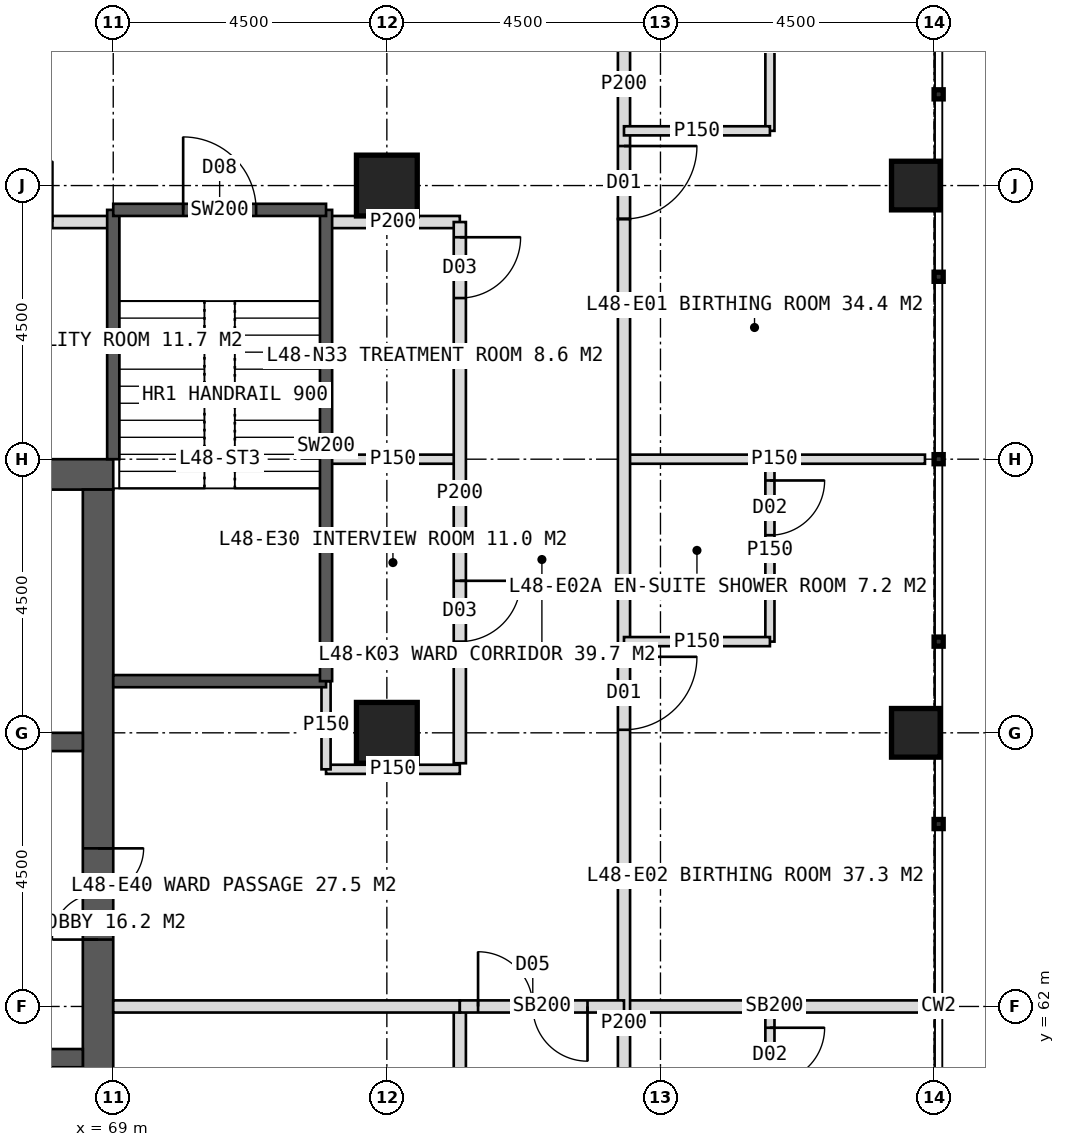
"""IFC4 building model, lengths in metres.
Left out: names, types, materials, properties, quantities, classifications, styles, units other than length and angle.
Written with IfcOpenShell. Run it as: python <this file> out.ifc"""

import sys

from ifc_helpers import new_model, si_unit, direction, frame, frame_2d, origin, origin_2d, place, context, subcontext, project, spatial, rectangle, hollow_rectangle, extrude, element, fill, save


model = new_model("IFC4")
c1 = context("Model", 3, precision=1e-05, world=origin(), true_north=direction((0.0, 1.0)))
c2 = subcontext(c1, "Body", "Model", "MODEL_VIEW")
j1 = project(units=[si_unit("LENGTHUNIT", "METRE"), si_unit("PLANEANGLEUNIT", "RADIAN")], contexts=[c1])
p1 = place(None, origin())
s1 = spatial("IfcSite", under=j1, at=p1, CompositionType="ELEMENT")
p2 = place(p1, origin())
s2 = spatial("IfcBuilding", under=s1, at=p2, CompositionType="ELEMENT")
p3 = place(p2, frame((0.0, 0.0, 201.0)))
s3 = spatial("IfcBuildingStorey", under=s2, at=p3, CompositionType="ELEMENT", Elevation=201.0)
p4 = place(p3, frame((51.0, 70.75, 0.0), z_axis=(0.0, 0.0, 1.0), x_axis=(1.0, 0.0, 0.0)))
e1 = element("IfcWall", 1, at=p4, inside=s3, PredefinedType="SHEAR", context=c2, shape_type="SweptSolid", body=[
    extrude(rectangle(XDim=18.0, YDim=0.5, at=frame_2d((9.0, 0.0))), origin(), (0.0, 0.0, 1.0), 4.0),
])
p5 = place(p4, frame((8.1, 0.0, 0.0)))
e2 = element("IfcOpeningElement", 2, at=p5, cuts=e1, PredefinedType="OPENING", context=c2, shape_type="SweptSolid", body=[
    extrude(rectangle(XDim=1.8, YDim=2.2, at=frame_2d((0.9, 1.1))), frame((0.0, 0.26, 0.0), z_axis=(0.0, -1.0, 0.0), x_axis=(1.0, 0.0, 0.0)), (0.0, 0.0, 1.0), 0.52),
])
p6 = place(p3, frame((68.75, 53.5, 0.0), z_axis=(0.0, 0.0, 1.0), x_axis=(0.0, 1.0, 0.0)))
e3 = element("IfcWall", 3, at=p6, inside=s3, PredefinedType="SHEAR", context=c2, shape_type="SweptSolid", body=[
    extrude(rectangle(XDim=17.0, YDim=0.5, at=frame_2d((8.5, 0.0))), origin(), (0.0, 0.0, 1.0), 4.0),
])
p7 = place(p6, frame((9.6, 0.0, 0.0)))
e4 = element("IfcOpeningElement", 4, at=p7, cuts=e3, PredefinedType="OPENING", context=c2, shape_type="SweptSolid", body=[
    extrude(rectangle(XDim=1.5, YDim=2.2, at=frame_2d((0.75, 1.1))), frame((0.0, 0.26, 0.0), z_axis=(0.0, -1.0, 0.0), x_axis=(1.0, 0.0, 0.0)), (0.0, 0.0, 1.0), 0.52),
])
p8 = place(p3, frame((65.2, 61.15, 0.0), z_axis=(0.0, 0.0, 1.0), x_axis=(1.0, 0.0, 0.0)))
e5 = element("IfcWall", 5, at=p8, inside=s3, PredefinedType="SHEAR", context=c2, shape_type="SweptSolid", body=[
    extrude(rectangle(XDim=3.3, YDim=0.3, at=frame_2d((1.65, 0.0))), origin(), (0.0, 0.0, 1.0), 4.0),
])
p9 = place(p8, frame((1.05, 0.0, 0.0)))
e6 = element("IfcOpeningElement", 6, at=p9, cuts=e5, PredefinedType="OPENING", context=c2, shape_type="SweptSolid", body=[
    extrude(rectangle(XDim=1.2, YDim=2.1, at=frame_2d((0.6, 1.05))), frame((0.0, 0.16, 0.0), z_axis=(0.0, -1.0, 0.0), x_axis=(1.0, 0.0, 0.0)), (0.0, 0.0, 1.0), 0.32),
])
p10 = place(p3, frame((65.2, 66.35, 0.0), z_axis=(0.0, 0.0, 1.0), x_axis=(1.0, 0.0, 0.0)))
e7 = element("IfcWall", 7, at=p10, inside=s3, PredefinedType="SHEAR", context=c2, shape_type="SweptSolid", body=[
    extrude(rectangle(XDim=3.3, YDim=0.3, at=frame_2d((1.65, 0.0))), origin(), (0.0, 0.0, 1.0), 4.0),
])
p11 = place(p10, frame((1.05, 0.0, 0.0)))
e8 = element("IfcOpeningElement", 8, at=p11, cuts=e7, PredefinedType="OPENING", context=c2, shape_type="SweptSolid", body=[
    extrude(rectangle(XDim=1.2, YDim=2.2, at=frame_2d((0.6, 1.1))), frame((0.0, 0.16, 0.0), z_axis=(0.0, -1.0, 0.0), x_axis=(1.0, 0.0, 0.0)), (0.0, 0.0, 1.0), 0.32),
])
for number, where, z_axis, x_axis in (
    (9, (73.5, 75.5, 0.0), (0.0, 0.0, 1.0), (1.0, 0.0, 0.0)),
    (10, (73.5, 66.5, 0.0), (0.0, 0.0, 1.0), (1.0, 0.0, 0.0)),
):
    element("IfcColumn", number, at=place(p3, frame(where, z_axis=z_axis, x_axis=x_axis)), inside=s3, PredefinedType="COLUMN", context=c2, shape_type="SweptSolid", body=[
        extrude(hollow_rectangle(XDim=1.0, YDim=1.0, WallThickness=0.1, at=origin_2d()), origin(), (0.0, 0.0, 1.0), 4.0),
    ])
for number, where, z_axis, x_axis in (
    (11, (82.2, 66.5, 0.0), (0.0, 0.0, 1.0), (1.0, 0.0, 0.0)),
    (12, (82.2, 75.5, 0.0), (0.0, 0.0, 1.0), (1.0, 0.0, 0.0)),
):
    element("IfcColumn", number, at=place(p3, frame(where, z_axis=z_axis, x_axis=x_axis)), inside=s3, PredefinedType="COLUMN", context=c2, shape_type="SweptSolid", body=[
        extrude(hollow_rectangle(XDim=0.8, YDim=0.8, WallThickness=0.08, at=origin_2d()), origin(), (0.0, 0.0, 1.0), 4.0),
    ])
p12 = place(p3, frame((62.25, 74.9, 0.0), z_axis=(0.0, 0.0, 1.0), x_axis=(1.0, 0.0, 0.0)))
e13 = element("IfcWall", 13, at=p12, inside=s3, PredefinedType="PARTITIONING", context=c2, shape_type="SweptSolid", body=[
    extrude(rectangle(XDim=6.75, YDim=0.2, at=frame_2d((3.375, 0.0))), origin(), (0.0, 0.0, 1.0), 3.75),
])
p13 = place(p12, frame((0.325, 0.0, 0.0)))
e14 = element("IfcOpeningElement", 14, at=p13, cuts=e13, PredefinedType="OPENING", context=c2, shape_type="SweptSolid", body=[
    extrude(rectangle(XDim=1.0, YDim=2.1, at=frame_2d((0.5, 1.05))), frame((0.0, 0.11, 0.0), z_axis=(0.0, -1.0, 0.0), x_axis=(1.0, 0.0, 0.0)), (0.0, 0.0, 1.0), 0.22),
])
p14 = place(p12, frame((4.75, 0.0, 0.0)))
e15 = element("IfcOpeningElement", 15, at=p14, cuts=e13, PredefinedType="OPENING", context=c2, shape_type="SweptSolid", body=[
    extrude(rectangle(XDim=1.0, YDim=2.1, at=frame_2d((0.5, 1.05))), frame((0.0, 0.11, 0.0), z_axis=(0.0, -1.0, 0.0), x_axis=(1.0, 0.0, 0.0)), (0.0, 0.0, 1.0), 0.22),
])
p15 = place(p3, frame((72.5, 74.9, 0.0), z_axis=(0.0, 0.0, 1.0), x_axis=(1.0, 0.0, 0.0)))
e16 = element("IfcWall", 16, at=p15, inside=s3, PredefinedType="PARTITIONING", context=c2, shape_type="SweptSolid", body=[
    extrude(rectangle(XDim=2.2, YDim=0.2, at=frame_2d((1.1, 0.0))), origin(), (0.0, 0.0, 1.0), 3.75),
])
p16 = place(p3, frame((77.4, 71.0, 0.0), z_axis=(0.0, 0.0, 1.0), x_axis=(1.0, 0.0, 0.0)))
e17 = element("IfcWall", 17, at=p16, inside=s3, PredefinedType="PARTITIONING", context=c2, shape_type="SweptSolid", body=[
    extrude(rectangle(XDim=4.95, YDim=0.15, at=frame_2d((2.475, 0.0))), origin(), (0.0, 0.0, 1.0), 3.75),
])
p17 = place(p3, frame((77.4, 62.0, 0.0), z_axis=(0.0, 0.0, 1.0), x_axis=(1.0, 0.0, 0.0)))
e18 = element("IfcWall", 18, at=p17, inside=s3, PredefinedType="SOLIDWALL", context=c2, shape_type="SweptSolid", body=[
    extrude(rectangle(XDim=4.95, YDim=0.2, at=frame_2d((2.475, 0.0))), origin(), (0.0, 0.0, 1.0), 2.95),
])
p18 = place(p3, frame((77.4, 79.4, 0.0), z_axis=(0.0, 0.0, 1.0), x_axis=(0.0, -1.0, 0.0)))
e19 = element("IfcWall", 19, at=p18, inside=s3, PredefinedType="PARTITIONING", context=c2, shape_type="SweptSolid", body=[
    extrude(rectangle(XDim=4.45, YDim=0.2, at=frame_2d((2.225, 0.0))), origin(), (0.0, 0.0, 1.0), 2.85),
])
p19 = place(p18, frame((3.25, 0.0, 0.0)))
e20 = element("IfcOpeningElement", 20, at=p19, cuts=e19, PredefinedType="OPENING", context=c2, shape_type="SweptSolid", body=[
    extrude(rectangle(XDim=1.2, YDim=2.2, at=frame_2d((0.6, 1.1))), frame((0.0, 0.11, 0.0), z_axis=(0.0, -1.0, 0.0), x_axis=(1.0, 0.0, 0.0)), (0.0, 0.0, 1.0), 0.22),
])
p20 = place(p3, frame((77.4, 74.95, 0.0), z_axis=(0.0, 0.0, 1.0), x_axis=(0.0, -1.0, 0.0)))
e21 = element("IfcWall", 21, at=p20, inside=s3, PredefinedType="PARTITIONING", context=c2, shape_type="SweptSolid", body=[
    extrude(rectangle(XDim=26.45, YDim=0.2, at=frame_2d((13.225, 0.0))), origin(), (0.0, 0.0, 1.0), 3.75),
])
p21 = place(p20, frame((7.2, 0.0, 0.0)))
e22 = element("IfcOpeningElement", 22, at=p21, cuts=e21, PredefinedType="OPENING", context=c2, shape_type="SweptSolid", body=[
    extrude(rectangle(XDim=1.2, YDim=2.2, at=frame_2d((0.6, 1.1))), frame((0.0, 0.11, 0.0), z_axis=(0.0, -1.0, 0.0), x_axis=(1.0, 0.0, 0.0)), (0.0, 0.0, 1.0), 0.22),
])
p22 = place(p20, frame((16.2, 0.0, 0.0)))
e23 = element("IfcOpeningElement", 23, at=p22, cuts=e21, PredefinedType="OPENING", context=c2, shape_type="SweptSolid", body=[
    extrude(rectangle(XDim=1.2, YDim=2.2, at=frame_2d((0.6, 1.1))), frame((0.0, 0.11, 0.0), z_axis=(0.0, -1.0, 0.0), x_axis=(1.0, 0.0, 0.0)), (0.0, 0.0, 1.0), 0.22),
])
p23 = place(p20, frame((25.2, 0.0, 0.0)))
e24 = element("IfcOpeningElement", 24, at=p23, cuts=e21, PredefinedType="OPENING", context=c2, shape_type="SweptSolid", body=[
    extrude(rectangle(XDim=1.2, YDim=2.2, at=frame_2d((0.6, 1.1))), frame((0.0, 0.11, 0.0), z_axis=(0.0, -1.0, 0.0), x_axis=(1.0, 0.0, 0.0)), (0.0, 0.0, 1.0), 0.22),
])
p24 = place(p3, frame((79.8, 79.4, 0.0), z_axis=(0.0, 0.0, 1.0), x_axis=(0.0, -1.0, 0.0)))
e25 = element("IfcWall", 25, at=p24, inside=s3, PredefinedType="PARTITIONING", context=c2, shape_type="SweptSolid", body=[
    extrude(rectangle(XDim=3.0, YDim=0.15, at=frame_2d((1.5, 0.0))), origin(), (0.0, 0.0, 1.0), 3.75),
])
p25 = place(p24, frame((0.35, 0.0, 0.0)))
e26 = element("IfcOpeningElement", 26, at=p25, cuts=e25, PredefinedType="OPENING", context=c2, shape_type="SweptSolid", body=[
    extrude(rectangle(XDim=0.9, YDim=2.1, at=frame_2d((0.45, 1.05))), frame((0.0, 0.085, 0.0), z_axis=(0.0, -1.0, 0.0), x_axis=(1.0, 0.0, 0.0)), (0.0, 0.0, 1.0), 0.17),
])
p26 = place(p3, frame((77.4, 76.4, 0.0), z_axis=(0.0, 0.0, 1.0), x_axis=(1.0, 0.0, 0.0)))
e27 = element("IfcWall", 27, at=p26, inside=s3, PredefinedType="PARTITIONING", context=c2, shape_type="SweptSolid", body=[
    extrude(rectangle(XDim=2.4, YDim=0.15, at=frame_2d((1.2, 0.0))), origin(), (0.0, 0.0, 1.0), 3.75),
])
p27 = place(p3, frame((79.8, 71.0, 0.0), z_axis=(0.0, 0.0, 1.0), x_axis=(0.0, -1.0, 0.0)))
e28 = element("IfcWall", 28, at=p27, inside=s3, PredefinedType="PARTITIONING", context=c2, shape_type="SweptSolid", body=[
    extrude(rectangle(XDim=3.0, YDim=0.15, at=frame_2d((1.5, 0.0))), origin(), (0.0, 0.0, 1.0), 3.75),
])
p28 = place(p27, frame((0.35, 0.0, 0.0)))
e29 = element("IfcOpeningElement", 29, at=p28, cuts=e28, PredefinedType="OPENING", context=c2, shape_type="SweptSolid", body=[
    extrude(rectangle(XDim=0.9, YDim=2.1, at=frame_2d((0.45, 1.05))), frame((0.0, 0.085, 0.0), z_axis=(0.0, -1.0, 0.0), x_axis=(1.0, 0.0, 0.0)), (0.0, 0.0, 1.0), 0.17),
])
p29 = place(p3, frame((77.4, 68.0, 0.0), z_axis=(0.0, 0.0, 1.0), x_axis=(1.0, 0.0, 0.0)))
e30 = element("IfcWall", 30, at=p29, inside=s3, PredefinedType="PARTITIONING", context=c2, shape_type="SweptSolid", body=[
    extrude(rectangle(XDim=2.4, YDim=0.15, at=frame_2d((1.2, 0.0))), origin(), (0.0, 0.0, 1.0), 3.75),
])
p30 = place(p3, frame((79.8, 62.0, 0.0), z_axis=(0.0, 0.0, 1.0), x_axis=(0.0, -1.0, 0.0)))
e31 = element("IfcWall", 31, at=p30, inside=s3, PredefinedType="PARTITIONING", context=c2, shape_type="SweptSolid", body=[
    extrude(rectangle(XDim=3.0, YDim=0.15, at=frame_2d((1.5, 0.0))), origin(), (0.0, 0.0, 1.0), 3.75),
])
p31 = place(p30, frame((0.35, 0.0, 0.0)))
e32 = element("IfcOpeningElement", 32, at=p31, cuts=e31, PredefinedType="OPENING", context=c2, shape_type="SweptSolid", body=[
    extrude(rectangle(XDim=0.9, YDim=2.1, at=frame_2d((0.45, 1.05))), frame((0.0, 0.085, 0.0), z_axis=(0.0, -1.0, 0.0), x_axis=(1.0, 0.0, 0.0)), (0.0, 0.0, 1.0), 0.17),
])
p32 = place(p3, frame((72.5, 71.0, 0.0), z_axis=(0.0, 0.0, 1.0), x_axis=(1.0, 0.0, 0.0)))
e33 = element("IfcWall", 33, at=p32, inside=s3, PredefinedType="PARTITIONING", context=c2, shape_type="SweptSolid", body=[
    extrude(rectangle(XDim=2.2, YDim=0.15, at=frame_2d((1.1, 0.0))), origin(), (0.0, 0.0, 1.0), 3.75),
])
p33 = place(p3, frame((74.7, 74.9, 0.0), z_axis=(0.0, 0.0, 1.0), x_axis=(0.0, -1.0, 0.0)))
e34 = element("IfcWall", 34, at=p33, inside=s3, PredefinedType="PARTITIONING", context=c2, shape_type="SweptSolid", body=[
    extrude(rectangle(XDim=8.9, YDim=0.2, at=frame_2d((4.45, 0.0))), origin(), (0.0, 0.0, 1.0), 3.75),
])
p34 = place(p33, frame((0.25, 0.0, 0.0)))
e35 = element("IfcOpeningElement", 35, at=p34, cuts=e34, PredefinedType="OPENING", context=c2, shape_type="SweptSolid", body=[
    extrude(rectangle(XDim=1.0, YDim=2.1, at=frame_2d((0.5, 1.05))), frame((0.0, 0.11, 0.0), z_axis=(0.0, -1.0, 0.0), x_axis=(1.0, 0.0, 0.0)), (0.0, 0.0, 1.0), 0.22),
])
p35 = place(p33, frame((5.9, 0.0, 0.0)))
e36 = element("IfcOpeningElement", 36, at=p35, cuts=e34, PredefinedType="OPENING", context=c2, shape_type="SweptSolid", body=[
    extrude(rectangle(XDim=1.0, YDim=2.1, at=frame_2d((0.5, 1.05))), frame((0.0, 0.11, 0.0), z_axis=(0.0, -1.0, 0.0), x_axis=(1.0, 0.0, 0.0)), (0.0, 0.0, 1.0), 0.22),
])
p36 = place(p3, frame((74.7, 62.0, 0.0), z_axis=(0.0, 0.0, 1.0), x_axis=(0.0, -1.0, 0.0)))
e37 = element("IfcWall", 37, at=p36, inside=s3, PredefinedType="PARTITIONING", context=c2, shape_type="SweptSolid", body=[
    extrude(rectangle(XDim=14.7, YDim=0.2, at=frame_2d((7.35, 0.0))), origin(), (0.0, 0.0, 1.0), 3.75),
])
p37 = place(p36, frame((1.45, 0.0, 0.0)))
e38 = element("IfcOpeningElement", 38, at=p37, cuts=e37, PredefinedType="OPENING", context=c2, shape_type="SweptSolid", body=[
    extrude(rectangle(XDim=1.0, YDim=2.1, at=frame_2d((0.5, 1.05))), frame((0.0, 0.11, 0.0), z_axis=(0.0, -1.0, 0.0), x_axis=(1.0, 0.0, 0.0)), (0.0, 0.0, 1.0), 0.22),
])
p38 = place(p36, frame((11.35, 0.0, 0.0)))
e39 = element("IfcOpeningElement", 39, at=p38, cuts=e37, PredefinedType="OPENING", context=c2, shape_type="SweptSolid", body=[
    extrude(rectangle(XDim=1.0, YDim=2.1, at=frame_2d((0.5, 1.05))), frame((0.0, 0.11, 0.0), z_axis=(0.0, -1.0, 0.0), x_axis=(1.0, 0.0, 0.0)), (0.0, 0.0, 1.0), 0.22),
])
p39 = place(p3, frame((72.5, 65.9, 0.0), z_axis=(0.0, 0.0, 1.0), x_axis=(1.0, 0.0, 0.0)))
e40 = element("IfcWall", 40, at=p39, inside=s3, PredefinedType="PARTITIONING", context=c2, shape_type="SweptSolid", body=[
    extrude(rectangle(XDim=2.2, YDim=0.15, at=frame_2d((1.1, 0.0))), origin(), (0.0, 0.0, 1.0), 3.75),
])
p40 = place(p3, frame((69.0, 62.0, 0.0), z_axis=(0.0, 0.0, 1.0), x_axis=(1.0, 0.0, 0.0)))
e41 = element("IfcWall", 41, at=p40, inside=s3, PredefinedType="SOLIDWALL", context=c2, shape_type="SweptSolid", body=[
    extrude(rectangle(XDim=5.7, YDim=0.2, at=frame_2d((2.85, 0.0))), origin(), (0.0, 0.0, 1.0), 2.95),
])
p41 = place(p3, frame((74.7, 62.0, 0.0), z_axis=(0.0, 0.0, 1.0), x_axis=(1.0, 0.0, 0.0)))
e42 = element("IfcWall", 42, at=p41, inside=s3, PredefinedType="SOLIDWALL", context=c2, shape_type="SweptSolid", body=[
    extrude(rectangle(XDim=2.7, YDim=0.2, at=frame_2d((1.35, 0.0))), origin(), (0.0, 0.0, 1.0), 2.95),
])
p42 = place(p41, frame((0.3, 0.0, 0.0)))
e43 = element("IfcOpeningElement", 43, at=p42, cuts=e42, PredefinedType="OPENING", context=c2, shape_type="SweptSolid", body=[
    extrude(rectangle(XDim=1.8, YDim=2.2, at=frame_2d((0.9, 1.1))), frame((0.0, 0.11, 0.0), z_axis=(0.0, -1.0, 0.0), x_axis=(1.0, 0.0, 0.0)), (0.0, 0.0, 1.0), 0.22),
])
p43 = place(p3, frame((72.5, 65.9, 0.0), z_axis=(0.0, 0.0, 1.0), x_axis=(0.0, 1.0, 0.0)))
e44 = element("IfcWall", 44, at=p43, inside=s3, PredefinedType="PARTITIONING", context=c2, shape_type="SweptSolid", body=[
    extrude(rectangle(XDim=1.45, YDim=0.15, at=frame_2d((0.725, 0.0))), origin(), (0.0, 0.0, 1.0), 3.75),
])
p44 = place(p3, frame((69.0, 71.0, 0.0), z_axis=(0.0, 0.0, 1.0), x_axis=(0.0, 1.0, 0.0)))
e45 = element("IfcWall", 45, at=p44, inside=s3, PredefinedType="SOLIDWALL", context=c2, shape_type="SweptSolid", body=[
    extrude(rectangle(XDim=4.1, YDim=0.2, at=frame_2d((2.05, 0.0))), origin(), (0.0, 0.0, 1.0), 3.75),
])
p45 = place(p3, frame((69.0, 67.35, 0.0), z_axis=(0.0, 0.0, 1.0), x_axis=(1.0, 0.0, 0.0)))
e46 = element("IfcWall", 46, at=p45, inside=s3, PredefinedType="SOLIDWALL", context=c2, shape_type="SweptSolid", body=[
    extrude(rectangle(XDim=3.5, YDim=0.2, at=frame_2d((1.75, 0.0))), origin(), (0.0, 0.0, 1.0), 3.75),
])
p46 = place(p3, frame((72.5, 67.35, 0.0), z_axis=(0.0, 0.0, 1.0), x_axis=(0.0, 1.0, 0.0)))
e47 = element("IfcWall", 47, at=p46, inside=s3, PredefinedType="SOLIDWALL", context=c2, shape_type="SweptSolid", body=[
    extrude(rectangle(XDim=7.75, YDim=0.2, at=frame_2d((3.875, 0.0))), origin(), (0.0, 0.0, 1.0), 3.75),
])
p47 = place(p3, frame((69.0, 75.1, 0.0), z_axis=(0.0, 0.0, 1.0), x_axis=(1.0, 0.0, 0.0)))
e48 = element("IfcWall", 48, at=p47, inside=s3, PredefinedType="SOLIDWALL", context=c2, shape_type="SweptSolid", body=[
    extrude(rectangle(XDim=3.5, YDim=0.2, at=frame_2d((1.75, 0.0))), origin(), (0.0, 0.0, 1.0), 3.75),
])
p48 = place(p47, frame((1.15, 0.0, 0.0)))
e49 = element("IfcOpeningElement", 49, at=p48, cuts=e48, PredefinedType="OPENING", context=c2, shape_type="SweptSolid", body=[
    extrude(rectangle(XDim=1.2, YDim=2.1, at=frame_2d((0.6, 1.05))), frame((0.0, 0.11, 0.0), z_axis=(0.0, -1.0, 0.0), x_axis=(1.0, 0.0, 0.0)), (0.0, 0.0, 1.0), 0.22),
])
p49 = place(p34, origin())
e50 = element("IfcDoor", 50, at=p49, inside=s3, OperationType="SINGLE_SWING_LEFT", PredefinedType="DOOR", context=c2, shape_type="SweptSolid", body=[
    extrude(rectangle(XDim=1.0, YDim=2.1, at=frame_2d((0.5, 1.05))), frame((0.0, 0.025, 0.0), z_axis=(0.0, -1.0, 0.0), x_axis=(1.0, 0.0, 0.0)), (0.0, 0.0, 1.0), 0.05),
])
fill(e35, e50)
p50 = place(p19, origin())
e51 = element("IfcDoor", 51, at=p50, inside=s3, OperationType="SINGLE_SWING_LEFT", PredefinedType="DOOR", context=c2, shape_type="SweptSolid", body=[
    extrude(rectangle(XDim=1.2, YDim=2.2, at=frame_2d((0.6, 1.1))), frame((0.0, 0.025, 0.0), z_axis=(0.0, -1.0, 0.0), x_axis=(1.0, 0.0, 0.0)), (0.0, 0.0, 1.0), 0.05),
])
fill(e20, e51)
p51 = place(p21, origin())
e52 = element("IfcDoor", 52, at=p51, inside=s3, OperationType="SINGLE_SWING_LEFT", PredefinedType="DOOR", context=c2, shape_type="SweptSolid", body=[
    extrude(rectangle(XDim=1.2, YDim=2.2, at=frame_2d((0.6, 1.1))), frame((0.0, 0.025, 0.0), z_axis=(0.0, -1.0, 0.0), x_axis=(1.0, 0.0, 0.0)), (0.0, 0.0, 1.0), 0.05),
])
fill(e22, e52)
p52 = place(p28, origin())
e53 = element("IfcDoor", 53, at=p52, inside=s3, OperationType="SINGLE_SWING_LEFT", PredefinedType="DOOR", context=c2, shape_type="SweptSolid", body=[
    extrude(rectangle(XDim=0.9, YDim=2.1, at=frame_2d((0.45, 1.05))), frame((0.0, 0.025, 0.0), z_axis=(0.0, -1.0, 0.0), x_axis=(1.0, 0.0, 0.0)), (0.0, 0.0, 1.0), 0.05),
])
fill(e29, e53)
p53 = place(p31, origin())
e54 = element("IfcDoor", 54, at=p53, inside=s3, OperationType="SINGLE_SWING_LEFT", PredefinedType="DOOR", context=c2, shape_type="SweptSolid", body=[
    extrude(rectangle(XDim=0.9, YDim=2.1, at=frame_2d((0.45, 1.05))), frame((0.0, 0.025, 0.0), z_axis=(0.0, -1.0, 0.0), x_axis=(1.0, 0.0, 0.0)), (0.0, 0.0, 1.0), 0.05),
])
fill(e32, e54)
p54 = place(p35, origin())
e55 = element("IfcDoor", 55, at=p54, inside=s3, OperationType="SINGLE_SWING_LEFT", PredefinedType="DOOR", context=c2, shape_type="SweptSolid", body=[
    extrude(rectangle(XDim=1.0, YDim=2.1, at=frame_2d((0.5, 1.05))), frame((0.0, 0.025, 0.0), z_axis=(0.0, -1.0, 0.0), x_axis=(1.0, 0.0, 0.0)), (0.0, 0.0, 1.0), 0.05),
])
fill(e36, e55)
p55 = place(p42, origin())
e56 = element("IfcDoor", 56, at=p55, inside=s3, OperationType="DOUBLE_DOOR_DOUBLE_SWING", PredefinedType="DOOR", context=c2, shape_type="SweptSolid", body=[
    extrude(rectangle(XDim=1.8, YDim=2.2, at=frame_2d((0.9, 1.1))), frame((0.0, 0.025, 0.0), z_axis=(0.0, -1.0, 0.0), x_axis=(1.0, 0.0, 0.0)), (0.0, 0.0, 1.0), 0.05),
])
fill(e43, e56)
p56 = place(p7, origin())
e57 = element("IfcDoor", 57, at=p56, inside=s3, OperationType="DOUBLE_DOOR_SINGLE_SWING", PredefinedType="DOOR", context=c2, shape_type="SweptSolid", body=[
    extrude(rectangle(XDim=1.5, YDim=2.2, at=frame_2d((0.75, 1.1))), frame((0.0, 0.025, 0.0), z_axis=(0.0, -1.0, 0.0), x_axis=(1.0, 0.0, 0.0)), (0.0, 0.0, 1.0), 0.05),
])
fill(e4, e57)
p57 = place(p48, origin())
e58 = element("IfcDoor", 58, at=p57, inside=s3, OperationType="SINGLE_SWING_LEFT", PredefinedType="DOOR", context=c2, shape_type="SweptSolid", body=[
    extrude(rectangle(XDim=1.2, YDim=2.1, at=frame_2d((0.6, 1.05))), frame((0.0, 0.025, 0.0), z_axis=(0.0, -1.0, 0.0), x_axis=(1.0, 0.0, 0.0)), (0.0, 0.0, 1.0), 0.05),
])
fill(e49, e58)
save(model, sys.argv[1])
